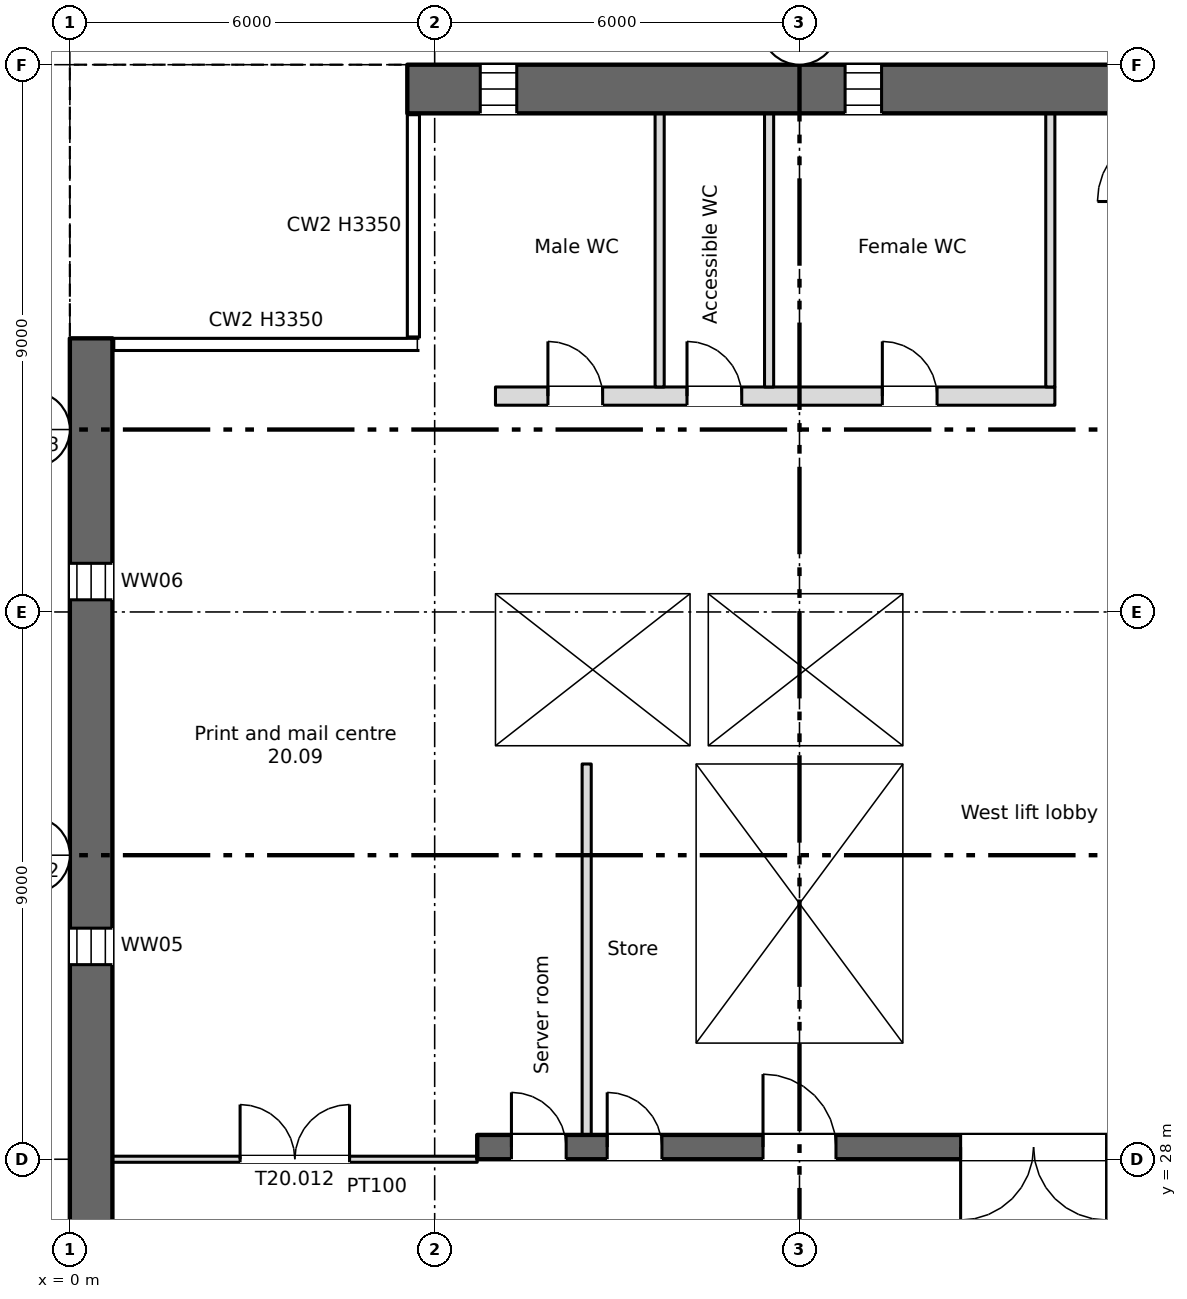
"""IFC4 building model, lengths in metres.
Left out: names, types, materials, properties, quantities, classifications, styles, units other than length and angle.
Written with IfcOpenShell. Run it as: python <this file> out.ifc"""

import sys

from ifc_helpers import new_model, si_unit, direction, frame, frame_2d, origin, place, context, subcontext, project, spatial, rectangle, extrude, element, fill, save


model = new_model("IFC4")
c1 = context("Model", 3, precision=1e-05, world=origin(), true_north=direction((0.0, 1.0)))
c2 = subcontext(c1, "Body", "Model", "MODEL_VIEW")
j1 = project(units=[si_unit("LENGTHUNIT", "METRE"), si_unit("PLANEANGLEUNIT", "RADIAN")], contexts=[c1])
p1 = place(None, origin())
s1 = spatial("IfcSite", under=j1, at=p1, CompositionType="ELEMENT")
p2 = place(p1, origin())
s2 = spatial("IfcBuilding", under=s1, at=p2, CompositionType="ELEMENT")
p3 = place(p2, frame((0.0, 0.0, 132.5)))
s3 = spatial("IfcBuildingStorey", under=s2, at=p3, CompositionType="ELEMENT", Elevation=132.5)
p4 = place(p3, frame((0.35, 6.0, 0.0), z_axis=(0.0, 0.0, 1.0), x_axis=(0.0, 1.0, 0.0)))
e1 = element("IfcWall", 1, at=p4, inside=s3, PredefinedType="SHEAR", context=c2, shape_type="SweptSolid", body=[
    extrude(rectangle(XDim=35.5, YDim=0.7, at=frame_2d((17.75, 0.0))), origin(), (0.0, 0.0, 1.0), 3.35),
])
p5 = place(p4, frame((1.2, 0.0, 0.6)))
e2 = element("IfcOpeningElement", 2, at=p5, cuts=e1, PredefinedType="OPENING", context=c2, shape_type="SweptSolid", body=[
    extrude(rectangle(XDim=0.6, YDim=2.4, at=frame_2d((0.3, 1.2))), frame((0.0, 0.36, 0.0), z_axis=(0.0, -1.0, 0.0), x_axis=(1.0, 0.0, 0.0)), (0.0, 0.0, 1.0), 0.72),
])
p6 = place(p4, frame((7.2, 0.0, 0.6)))
e3 = element("IfcOpeningElement", 3, at=p6, cuts=e1, PredefinedType="OPENING", context=c2, shape_type="SweptSolid", body=[
    extrude(rectangle(XDim=0.6, YDim=2.4, at=frame_2d((0.3, 1.2))), frame((0.0, 0.36, 0.0), z_axis=(0.0, -1.0, 0.0), x_axis=(1.0, 0.0, 0.0)), (0.0, 0.0, 1.0), 0.72),
])
p7 = place(p4, frame((13.2, 0.0, 0.6)))
e4 = element("IfcOpeningElement", 4, at=p7, cuts=e1, PredefinedType="OPENING", context=c2, shape_type="SweptSolid", body=[
    extrude(rectangle(XDim=0.6, YDim=2.4, at=frame_2d((0.3, 1.2))), frame((0.0, 0.36, 0.0), z_axis=(0.0, -1.0, 0.0), x_axis=(1.0, 0.0, 0.0)), (0.0, 0.0, 1.0), 0.72),
])
p8 = place(p4, frame((19.2, 0.0, 0.6)))
e5 = element("IfcOpeningElement", 5, at=p8, cuts=e1, PredefinedType="OPENING", context=c2, shape_type="SweptSolid", body=[
    extrude(rectangle(XDim=0.6, YDim=2.4, at=frame_2d((0.3, 1.2))), frame((0.0, 0.36, 0.0), z_axis=(0.0, -1.0, 0.0), x_axis=(1.0, 0.0, 0.0)), (0.0, 0.0, 1.0), 0.72),
])
p9 = place(p4, frame((25.2, 0.0, 0.6)))
e6 = element("IfcOpeningElement", 6, at=p9, cuts=e1, PredefinedType="OPENING", context=c2, shape_type="SweptSolid", body=[
    extrude(rectangle(XDim=0.6, YDim=2.4, at=frame_2d((0.3, 1.2))), frame((0.0, 0.36, 0.0), z_axis=(0.0, -1.0, 0.0), x_axis=(1.0, 0.0, 0.0)), (0.0, 0.0, 1.0), 0.72),
])
p10 = place(p4, frame((31.2, 0.0, 0.6)))
e7 = element("IfcOpeningElement", 7, at=p10, cuts=e1, PredefinedType="OPENING", context=c2, shape_type="SweptSolid", body=[
    extrude(rectangle(XDim=0.6, YDim=2.4, at=frame_2d((0.3, 1.2))), frame((0.0, 0.36, 0.0), z_axis=(0.0, -1.0, 0.0), x_axis=(1.0, 0.0, 0.0)), (0.0, 0.0, 1.0), 0.72),
])
p11 = place(p3, frame((5.55, 45.6, 0.0), z_axis=(0.0, 0.0, 1.0), x_axis=(1.0, 0.0, 0.0)))
e8 = element("IfcWall", 8, at=p11, inside=s3, PredefinedType="SHEAR", context=c2, shape_type="SweptSolid", body=[
    extrude(rectangle(XDim=60.9, YDim=0.8, at=frame_2d((30.45, 0.0))), origin(), (0.0, 0.0, 1.0), 3.35),
])
p12 = place(p11, frame((1.2, 0.0, 0.6)))
e9 = element("IfcOpeningElement", 9, at=p12, cuts=e8, PredefinedType="OPENING", context=c2, shape_type="SweptSolid", body=[
    extrude(rectangle(XDim=0.6, YDim=2.4, at=frame_2d((0.3, 1.2))), frame((0.0, 0.41, 0.0), z_axis=(0.0, -1.0, 0.0), x_axis=(1.0, 0.0, 0.0)), (0.0, 0.0, 1.0), 0.82),
])
p13 = place(p11, frame((7.2, 0.0, 0.6)))
e10 = element("IfcOpeningElement", 10, at=p13, cuts=e8, PredefinedType="OPENING", context=c2, shape_type="SweptSolid", body=[
    extrude(rectangle(XDim=0.6, YDim=2.4, at=frame_2d((0.3, 1.2))), frame((0.0, 0.41, 0.0), z_axis=(0.0, -1.0, 0.0), x_axis=(1.0, 0.0, 0.0)), (0.0, 0.0, 1.0), 0.82),
])
p14 = place(p11, frame((55.2, 0.0, 0.6)))
e11 = element("IfcOpeningElement", 11, at=p14, cuts=e8, PredefinedType="OPENING", context=c2, shape_type="SweptSolid", body=[
    extrude(rectangle(XDim=0.6, YDim=2.4, at=frame_2d((0.3, 1.2))), frame((0.0, 0.41, 0.0), z_axis=(0.0, -1.0, 0.0), x_axis=(1.0, 0.0, 0.0)), (0.0, 0.0, 1.0), 0.82),
])
p15 = place(p3, frame((6.7, 28.2, 0.0), z_axis=(0.0, 0.0, 1.0), x_axis=(1.0, 0.0, 0.0)))
e12 = element("IfcWall", 12, at=p15, inside=s3, PredefinedType="SHEAR", context=c2, shape_type="SweptSolid", body=[
    extrude(rectangle(XDim=57.8, YDim=0.4, at=frame_2d((28.9, 0.0))), origin(), (0.0, 0.0, 1.0), 3.35),
])
p16 = place(p15, frame((12.812, 0.0, 0.0)))
e13 = element("IfcOpeningElement", 13, at=p16, cuts=e12, PredefinedType="OPENING", context=c2, shape_type="SweptSolid", body=[
    extrude(rectangle(XDim=0.9, YDim=2.1, at=frame_2d((0.45, 1.05))), frame((0.0, 0.21, 0.0), z_axis=(0.0, -1.0, 0.0), x_axis=(1.0, 0.0, 0.0)), (0.0, 0.0, 1.0), 0.42),
])
p17 = place(p15, frame((15.387, 0.0, 0.0)))
e14 = element("IfcOpeningElement", 14, at=p17, cuts=e12, PredefinedType="OPENING", context=c2, shape_type="SweptSolid", body=[
    extrude(rectangle(XDim=0.9, YDim=2.1, at=frame_2d((0.45, 1.05))), frame((0.0, 0.21, 0.0), z_axis=(0.0, -1.0, 0.0), x_axis=(1.0, 0.0, 0.0)), (0.0, 0.0, 1.0), 0.42),
])
p18 = place(p15, frame((48.312, 0.0, 0.0)))
e15 = element("IfcOpeningElement", 15, at=p18, cuts=e12, PredefinedType="OPENING", context=c2, shape_type="SweptSolid", body=[
    extrude(rectangle(XDim=0.9, YDim=2.1, at=frame_2d((0.45, 1.05))), frame((0.0, 0.21, 0.0), z_axis=(0.0, -1.0, 0.0), x_axis=(1.0, 0.0, 0.0)), (0.0, 0.0, 1.0), 0.42),
])
p19 = place(p15, frame((50.887, 0.0, 0.0)))
e16 = element("IfcOpeningElement", 16, at=p19, cuts=e12, PredefinedType="OPENING", context=c2, shape_type="SweptSolid", body=[
    extrude(rectangle(XDim=0.9, YDim=2.1, at=frame_2d((0.45, 1.05))), frame((0.0, 0.21, 0.0), z_axis=(0.0, -1.0, 0.0), x_axis=(1.0, 0.0, 0.0)), (0.0, 0.0, 1.0), 0.42),
])
p20 = place(p15, frame((0.562, 0.0, 0.0)))
e17 = element("IfcOpeningElement", 17, at=p20, cuts=e12, PredefinedType="OPENING", context=c2, shape_type="SweptSolid", body=[
    extrude(rectangle(XDim=0.9, YDim=2.1, at=frame_2d((0.45, 1.05))), frame((0.0, 0.21, 0.0), z_axis=(0.0, -1.0, 0.0), x_axis=(1.0, 0.0, 0.0)), (0.0, 0.0, 1.0), 0.42),
])
p21 = place(p15, frame((2.137, 0.0, 0.0)))
e18 = element("IfcOpeningElement", 18, at=p21, cuts=e12, PredefinedType="OPENING", context=c2, shape_type="SweptSolid", body=[
    extrude(rectangle(XDim=0.9, YDim=2.1, at=frame_2d((0.45, 1.05))), frame((0.0, 0.21, 0.0), z_axis=(0.0, -1.0, 0.0), x_axis=(1.0, 0.0, 0.0)), (0.0, 0.0, 1.0), 0.42),
])
p22 = place(p15, frame((4.7, 0.0, 0.0)))
e19 = element("IfcOpeningElement", 19, at=p22, cuts=e12, PredefinedType="OPENING", context=c2, shape_type="SweptSolid", body=[
    extrude(rectangle(XDim=1.2, YDim=2.1, at=frame_2d((0.6, 1.05))), frame((0.0, 0.21, 0.0), z_axis=(0.0, -1.0, 0.0), x_axis=(1.0, 0.0, 0.0)), (0.0, 0.0, 1.0), 0.42),
])
p23 = place(p15, frame((31.7, 0.0, 0.0)))
e20 = element("IfcOpeningElement", 20, at=p23, cuts=e12, PredefinedType="OPENING", context=c2, shape_type="SweptSolid", body=[
    extrude(rectangle(XDim=1.2, YDim=2.1, at=frame_2d((0.6, 1.05))), frame((0.0, 0.21, 0.0), z_axis=(0.0, -1.0, 0.0), x_axis=(1.0, 0.0, 0.0)), (0.0, 0.0, 1.0), 0.42),
])
p24 = place(p15, frame((55.2, 0.0, 0.0)))
e21 = element("IfcOpeningElement", 21, at=p24, cuts=e12, PredefinedType="OPENING", context=c2, shape_type="SweptSolid", body=[
    extrude(rectangle(XDim=1.2, YDim=2.1, at=frame_2d((0.6, 1.05))), frame((0.0, 0.21, 0.0), z_axis=(0.0, -1.0, 0.0), x_axis=(1.0, 0.0, 0.0)), (0.0, 0.0, 1.0), 0.42),
])
p25 = place(p15, frame((21.7, 0.0, 0.0)))
e22 = element("IfcOpeningElement", 22, at=p25, cuts=e12, PredefinedType="OPENING", context=c2, shape_type="SweptSolid", body=[
    extrude(rectangle(XDim=1.2, YDim=2.1, at=frame_2d((0.6, 1.05))), frame((0.0, 0.21, 0.0), z_axis=(0.0, -1.0, 0.0), x_axis=(1.0, 0.0, 0.0)), (0.0, 0.0, 1.0), 0.42),
])
p26 = place(p15, frame((41.7, 0.0, 0.0)))
e23 = element("IfcOpeningElement", 23, at=p26, cuts=e12, PredefinedType="OPENING", context=c2, shape_type="SweptSolid", body=[
    extrude(rectangle(XDim=1.2, YDim=2.1, at=frame_2d((0.6, 1.05))), frame((0.0, 0.21, 0.0), z_axis=(0.0, -1.0, 0.0), x_axis=(1.0, 0.0, 0.0)), (0.0, 0.0, 1.0), 0.42),
])
p27 = place(p15, frame((24.85, 0.0, 0.0)))
e24 = element("IfcOpeningElement", 24, at=p27, cuts=e12, PredefinedType="OPENING", context=c2, shape_type="SweptSolid", body=[
    extrude(rectangle(XDim=2.4, YDim=2.1, at=frame_2d((1.2, 1.05))), frame((0.0, 0.21, 0.0), z_axis=(0.0, -1.0, 0.0), x_axis=(1.0, 0.0, 0.0)), (0.0, 0.0, 1.0), 0.42),
])
p28 = place(p15, frame((37.35, 0.0, 0.0)))
e25 = element("IfcOpeningElement", 25, at=p28, cuts=e12, PredefinedType="OPENING", context=c2, shape_type="SweptSolid", body=[
    extrude(rectangle(XDim=2.4, YDim=2.1, at=frame_2d((1.2, 1.05))), frame((0.0, 0.21, 0.0), z_axis=(0.0, -1.0, 0.0), x_axis=(1.0, 0.0, 0.0)), (0.0, 0.0, 1.0), 0.42),
])
p29 = place(p15, frame((7.95, 0.0, 0.0)))
e26 = element("IfcOpeningElement", 26, at=p29, cuts=e12, PredefinedType="OPENING", context=c2, shape_type="SweptSolid", body=[
    extrude(rectangle(XDim=2.4, YDim=2.1, at=frame_2d((1.2, 1.05))), frame((0.0, 0.21, 0.0), z_axis=(0.0, -1.0, 0.0), x_axis=(1.0, 0.0, 0.0)), (0.0, 0.0, 1.0), 0.42),
])
p30 = place(p15, frame((28.85, 0.0, 0.0)))
e27 = element("IfcOpeningElement", 27, at=p30, cuts=e12, PredefinedType="OPENING", context=c2, shape_type="SweptSolid", body=[
    extrude(rectangle(XDim=0.9, YDim=2.1, at=frame_2d((0.45, 1.05))), frame((0.0, 0.21, 0.0), z_axis=(0.0, -1.0, 0.0), x_axis=(1.0, 0.0, 0.0)), (0.0, 0.0, 1.0), 0.42),
])
p31 = place(p15, frame((34.85, 0.0, 0.0)))
e28 = element("IfcOpeningElement", 28, at=p31, cuts=e12, PredefinedType="OPENING", context=c2, shape_type="SweptSolid", body=[
    extrude(rectangle(XDim=0.9, YDim=2.1, at=frame_2d((0.45, 1.05))), frame((0.0, 0.21, 0.0), z_axis=(0.0, -1.0, 0.0), x_axis=(1.0, 0.0, 0.0)), (0.0, 0.0, 1.0), 0.42),
])
p32 = place(p3, frame((6.85, 28.4, 0.0), z_axis=(0.0, 0.0, 1.0), x_axis=(0.0, 1.0, 0.0)))
e29 = element("IfcWall", 29, at=p32, inside=s3, PredefinedType="SHEAR", context=c2, shape_type="SweptSolid", body=[
    extrude(rectangle(XDim=16.8, YDim=0.3, at=frame_2d((8.4, 0.0))), origin(), (0.0, 0.0, 1.0), 3.35),
])
for number, where, z_axis, x_axis in (
    (30, (10.15, 28.4, 0.0), (0.0, 0.0, 1.0), (0.0, 1.0, 0.0)),
    (31, (13.85, 28.4, 0.0), (0.0, 0.0, 1.0), (0.0, 1.0, 0.0)),
):
    element("IfcWall", number, at=place(p3, frame(where, z_axis=z_axis, x_axis=x_axis)), inside=s3, PredefinedType="SHEAR", context=c2, shape_type="SweptSolid", body=[
        extrude(rectangle(XDim=6.1, YDim=0.3, at=frame_2d((3.05, 0.0))), origin(), (0.0, 0.0, 1.0), 3.35),
    ])
for number, where, z_axis, x_axis in (
    (32, (7.0, 34.65, 0.0), (0.0, 0.0, 1.0), (1.0, 0.0, 0.0)),
    (33, (7.0, 37.45, 0.0), (0.0, 0.0, 1.0), (1.0, 0.0, 0.0)),
):
    element("IfcWall", number, at=place(p3, frame(where, z_axis=z_axis, x_axis=x_axis)), inside=s3, PredefinedType="SHEAR", context=c2, shape_type="SweptSolid", body=[
        extrude(rectangle(XDim=7.0, YDim=0.3, at=frame_2d((3.5, 0.0))), origin(), (0.0, 0.0, 1.0), 3.35),
    ])
p33 = place(p3, frame((13.85, 34.8, 0.0), z_axis=(0.0, 0.0, 1.0), x_axis=(0.0, 1.0, 0.0)))
e34 = element("IfcWall", 34, at=p33, inside=s3, PredefinedType="SHEAR", context=c2, shape_type="SweptSolid", body=[
    extrude(rectangle(XDim=2.5, YDim=0.3, at=frame_2d((1.25, 0.0))), origin(), (0.0, 0.0, 1.0), 3.35),
])
p34 = place(p3, frame((7.0, 40.55, 0.0), z_axis=(0.0, 0.0, 1.0), x_axis=(1.0, 0.0, 0.0)))
e35 = element("IfcWall", 35, at=p34, inside=s3, PredefinedType="PARTITIONING", context=c2, shape_type="SweptSolid", body=[
    extrude(rectangle(XDim=9.2, YDim=0.3, at=frame_2d((4.6, 0.0))), origin(), (0.0, 0.0, 1.0), 3.35),
])
p35 = place(p34, frame((0.863, 0.0, 0.0)))
e36 = element("IfcOpeningElement", 36, at=p35, cuts=e35, PredefinedType="OPENING", context=c2, shape_type="SweptSolid", body=[
    extrude(rectangle(XDim=0.9, YDim=2.1, at=frame_2d((0.45, 1.05))), frame((0.0, 0.16, 0.0), z_axis=(0.0, -1.0, 0.0), x_axis=(1.0, 0.0, 0.0)), (0.0, 0.0, 1.0), 0.32),
])
p36 = place(p34, frame((3.15, 0.0, 0.0)))
e37 = element("IfcOpeningElement", 37, at=p36, cuts=e35, PredefinedType="OPENING", context=c2, shape_type="SweptSolid", body=[
    extrude(rectangle(XDim=0.9, YDim=2.1, at=frame_2d((0.45, 1.05))), frame((0.0, 0.16, 0.0), z_axis=(0.0, -1.0, 0.0), x_axis=(1.0, 0.0, 0.0)), (0.0, 0.0, 1.0), 0.32),
])
p37 = place(p34, frame((6.363, 0.0, 0.0)))
e38 = element("IfcOpeningElement", 38, at=p37, cuts=e35, PredefinedType="OPENING", context=c2, shape_type="SweptSolid", body=[
    extrude(rectangle(XDim=0.9, YDim=2.1, at=frame_2d((0.45, 1.05))), frame((0.0, 0.16, 0.0), z_axis=(0.0, -1.0, 0.0), x_axis=(1.0, 0.0, 0.0)), (0.0, 0.0, 1.0), 0.32),
])
p38 = place(p3, frame((10.35, 34.8, 0.0), z_axis=(0.0, 0.0, 1.0), x_axis=(0.0, 1.0, 0.0)))
e39 = element("IfcWall", 39, at=p38, inside=s3, PredefinedType="SHEAR", context=c2, shape_type="SweptSolid", body=[
    extrude(rectangle(XDim=2.5, YDim=0.3, at=frame_2d((1.25, 0.0))), origin(), (0.0, 0.0, 1.0), 3.35),
])
p39 = place(p3, frame((16.125, 40.7, 0.0), z_axis=(0.0, 0.0, 1.0), x_axis=(0.0, 1.0, 0.0)))
e40 = element("IfcWall", 40, at=p39, inside=s3, PredefinedType="PARTITIONING", context=c2, shape_type="SweptSolid", body=[
    extrude(rectangle(XDim=4.5, YDim=0.15, at=frame_2d((2.25, 0.0))), origin(), (0.0, 0.0, 1.0), 3.35),
])
p40 = place(p3, frame((8.5, 28.4, 0.0), z_axis=(0.0, 0.0, 1.0), x_axis=(0.0, 1.0, 0.0)))
e41 = element("IfcWall", 41, at=p40, inside=s3, PredefinedType="PARTITIONING", context=c2, shape_type="SweptSolid", body=[
    extrude(rectangle(XDim=6.1, YDim=0.15, at=frame_2d((3.05, 0.0))), origin(), (0.0, 0.0, 1.0), 3.35),
])
for number, where, z_axis, x_axis in (
    (42, (9.7, 40.7, 0.0), (0.0, 0.0, 1.0), (0.0, 1.0, 0.0)),
    (43, (11.5, 40.7, 0.0), (0.0, 0.0, 1.0), (0.0, 1.0, 0.0)),
):
    element("IfcWall", number, at=place(p3, frame(where, z_axis=z_axis, x_axis=x_axis)), inside=s3, PredefinedType="PARTITIONING", context=c2, shape_type="SweptSolid", body=[
        extrude(rectangle(XDim=4.5, YDim=0.15, at=frame_2d((2.25, 0.0))), origin(), (0.0, 0.0, 1.0), 3.35),
    ])
p41 = place(p3, frame((0.7, 28.0, 0.0), z_axis=(0.0, 0.0, 1.0), x_axis=(1.0, 0.0, 0.0)))
e44 = element("IfcWall", 44, at=p41, inside=s3, PredefinedType="PARTITIONING", context=c2, shape_type="SweptSolid", body=[
    extrude(rectangle(XDim=6.0, YDim=0.1, at=frame_2d((3.0, 0.0))), origin(), (0.0, 0.0, 1.0), 3.35),
])
p42 = place(p41, frame((2.1, 0.0, 0.0)))
e45 = element("IfcOpeningElement", 45, at=p42, cuts=e44, PredefinedType="OPENING", context=c2, shape_type="SweptSolid", body=[
    extrude(rectangle(XDim=1.8, YDim=2.1, at=frame_2d((0.9, 1.05))), frame((0.0, 0.06, 0.0), z_axis=(0.0, -1.0, 0.0), x_axis=(1.0, 0.0, 0.0)), (0.0, 0.0, 1.0), 0.12),
])
p43 = place(p12, origin())
e46 = element("IfcWindow", 46, at=p43, inside=s3, PartitioningType="SINGLE_PANEL", PredefinedType="WINDOW", context=c2, shape_type="SweptSolid", body=[
    extrude(rectangle(XDim=0.6, YDim=2.4, at=frame_2d((0.3, 1.2))), frame((0.0, 0.03, 0.0), z_axis=(0.0, -1.0, 0.0), x_axis=(1.0, 0.0, 0.0)), (0.0, 0.0, 1.0), 0.06),
])
fill(e9, e46)
p44 = place(p13, origin())
e47 = element("IfcWindow", 47, at=p44, inside=s3, PartitioningType="SINGLE_PANEL", PredefinedType="WINDOW", context=c2, shape_type="SweptSolid", body=[
    extrude(rectangle(XDim=0.6, YDim=2.4, at=frame_2d((0.3, 1.2))), frame((0.0, 0.03, 0.0), z_axis=(0.0, -1.0, 0.0), x_axis=(1.0, 0.0, 0.0)), (0.0, 0.0, 1.0), 0.06),
])
fill(e10, e47)
p45 = place(p9, origin())
e48 = element("IfcWindow", 48, at=p45, inside=s3, PartitioningType="SINGLE_PANEL", PredefinedType="WINDOW", context=c2, shape_type="SweptSolid", body=[
    extrude(rectangle(XDim=0.6, YDim=2.4, at=frame_2d((0.3, 1.2))), frame((0.0, 0.03, 0.0), z_axis=(0.0, -1.0, 0.0), x_axis=(1.0, 0.0, 0.0)), (0.0, 0.0, 1.0), 0.06),
])
fill(e6, e48)
p46 = place(p10, origin())
e49 = element("IfcWindow", 49, at=p46, inside=s3, PartitioningType="SINGLE_PANEL", PredefinedType="WINDOW", context=c2, shape_type="SweptSolid", body=[
    extrude(rectangle(XDim=0.6, YDim=2.4, at=frame_2d((0.3, 1.2))), frame((0.0, 0.03, 0.0), z_axis=(0.0, -1.0, 0.0), x_axis=(1.0, 0.0, 0.0)), (0.0, 0.0, 1.0), 0.06),
])
fill(e7, e49)
p47 = place(p20, origin())
e50 = element("IfcDoor", 50, at=p47, inside=s3, OperationType="SINGLE_SWING_LEFT", PredefinedType="DOOR", context=c2, shape_type="SweptSolid", body=[
    extrude(rectangle(XDim=0.9, YDim=2.1, at=frame_2d((0.45, 1.05))), frame((0.0, 0.025, 0.0), z_axis=(0.0, -1.0, 0.0), x_axis=(1.0, 0.0, 0.0)), (0.0, 0.0, 1.0), 0.05),
])
fill(e17, e50)
p48 = place(p21, origin())
e51 = element("IfcDoor", 51, at=p48, inside=s3, OperationType="SINGLE_SWING_LEFT", PredefinedType="DOOR", context=c2, shape_type="SweptSolid", body=[
    extrude(rectangle(XDim=0.9, YDim=2.1, at=frame_2d((0.45, 1.05))), frame((0.0, 0.025, 0.0), z_axis=(0.0, -1.0, 0.0), x_axis=(1.0, 0.0, 0.0)), (0.0, 0.0, 1.0), 0.05),
])
fill(e18, e51)
p49 = place(p35, origin())
e52 = element("IfcDoor", 52, at=p49, inside=s3, OperationType="SINGLE_SWING_LEFT", PredefinedType="DOOR", context=c2, shape_type="SweptSolid", body=[
    extrude(rectangle(XDim=0.9, YDim=2.1, at=frame_2d((0.45, 1.05))), frame((0.0, 0.025, 0.0), z_axis=(0.0, -1.0, 0.0), x_axis=(1.0, 0.0, 0.0)), (0.0, 0.0, 1.0), 0.05),
])
fill(e36, e52)
p50 = place(p36, origin())
e53 = element("IfcDoor", 53, at=p50, inside=s3, OperationType="SINGLE_SWING_LEFT", PredefinedType="DOOR", context=c2, shape_type="SweptSolid", body=[
    extrude(rectangle(XDim=0.9, YDim=2.1, at=frame_2d((0.45, 1.05))), frame((0.0, 0.025, 0.0), z_axis=(0.0, -1.0, 0.0), x_axis=(1.0, 0.0, 0.0)), (0.0, 0.0, 1.0), 0.05),
])
fill(e37, e53)
p51 = place(p37, origin())
e54 = element("IfcDoor", 54, at=p51, inside=s3, OperationType="SINGLE_SWING_LEFT", PredefinedType="DOOR", context=c2, shape_type="SweptSolid", body=[
    extrude(rectangle(XDim=0.9, YDim=2.1, at=frame_2d((0.45, 1.05))), frame((0.0, 0.025, 0.0), z_axis=(0.0, -1.0, 0.0), x_axis=(1.0, 0.0, 0.0)), (0.0, 0.0, 1.0), 0.05),
])
fill(e38, e54)
p52 = place(p22, origin())
e55 = element("IfcDoor", 55, at=p52, inside=s3, OperationType="SINGLE_SWING_LEFT", PredefinedType="DOOR", context=c2, shape_type="SweptSolid", body=[
    extrude(rectangle(XDim=1.2, YDim=2.1, at=frame_2d((0.6, 1.05))), frame((0.0, 0.025, 0.0), z_axis=(0.0, -1.0, 0.0), x_axis=(1.0, 0.0, 0.0)), (0.0, 0.0, 1.0), 0.05),
])
fill(e19, e55)
p53 = place(p29, origin())
e56 = element("IfcDoor", 56, at=p53, inside=s3, OperationType="DOUBLE_DOOR_SINGLE_SWING", PredefinedType="DOOR", context=c2, shape_type="SweptSolid", body=[
    extrude(rectangle(XDim=2.4, YDim=2.1, at=frame_2d((1.2, 1.05))), frame((0.0, 0.025, 0.0), z_axis=(0.0, -1.0, 0.0), x_axis=(1.0, 0.0, 0.0)), (0.0, 0.0, 1.0), 0.05),
])
fill(e26, e56)
p54 = place(p42, origin())
e57 = element("IfcDoor", 57, at=p54, inside=s3, OperationType="DOUBLE_DOOR_SINGLE_SWING", PredefinedType="DOOR", context=c2, shape_type="SweptSolid", body=[
    extrude(rectangle(XDim=1.8, YDim=2.1, at=frame_2d((0.9, 1.05))), frame((0.0, 0.025, 0.0), z_axis=(0.0, -1.0, 0.0), x_axis=(1.0, 0.0, 0.0)), (0.0, 0.0, 1.0), 0.05),
])
fill(e45, e57)
save(model, sys.argv[1])
